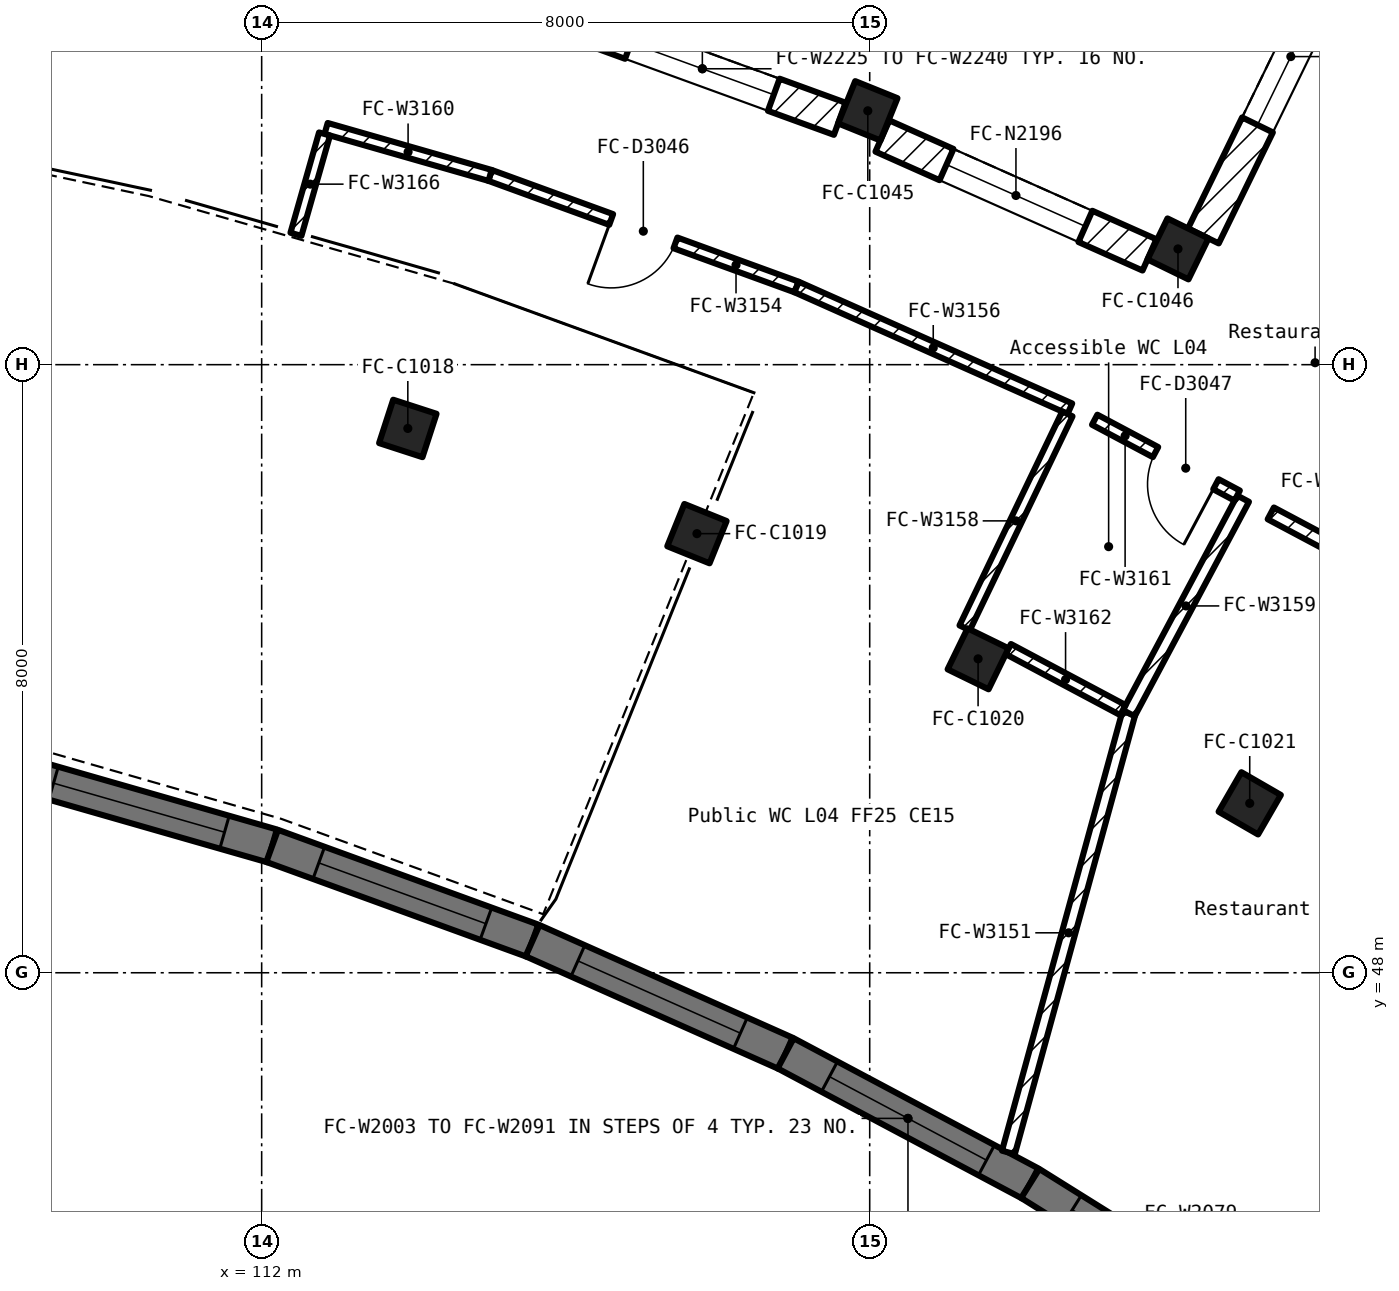
"""IFC4 building model, lengths in metres.
Left out: names, types, materials, properties, quantities, classifications, styles, units other than length and angle.
Written with IfcOpenShell. Run it as: python <this file> out.ifc"""

import sys

from ifc_helpers import new_model, si_unit, direction, frame, frame_2d, origin, origin_2d, place, context, subcontext, project, spatial, rectangle, extrude, element, fill, save


model = new_model("IFC4")
c1 = context("Model", 3, precision=1e-05, world=origin(), true_north=direction((0.0, 1.0)))
c2 = subcontext(c1, "Body", "Model", "MODEL_VIEW")
j1 = project(units=[si_unit("LENGTHUNIT", "METRE"), si_unit("PLANEANGLEUNIT", "RADIAN")], contexts=[c1])
p1 = place(None, origin())
s1 = spatial("IfcSite", under=j1, at=p1, CompositionType="ELEMENT")
p2 = place(p1, origin())
s2 = spatial("IfcBuilding", under=s1, at=p2, CompositionType="ELEMENT")
p3 = place(p2, frame((0.0, 0.0, 22.5)))
s3 = spatial("IfcBuildingStorey", under=s2, at=p3, CompositionType="ELEMENT", Elevation=22.5)
for number, where, z_axis, x_axis in (
    (1, (113.923, 55.161, 0.0), (0.0, 0.0, 1.0), (0.951, -0.309, 0.0)),
    (2, (117.727, 53.777, 0.0), (0.0, 0.0, 1.0), (0.927, -0.375, 0.0)),
    (3, (121.426, 52.13, 0.0), (0.0, 0.0, 1.0), (0.899, -0.438, 0.0)),
    (4, (125.0, 50.229, 0.0), (0.0, 0.0, 1.0), (0.866, -0.5, 0.0)),
    (5, (119.975, 59.34, 0.0), (0.0, 0.0, 1.0), (0.927, -0.375, 0.0)),
    (6, (124.056, 57.523, 0.0), (0.0, 0.0, 1.0), (0.899, -0.438, 0.0)),
):
    element("IfcColumn", number, at=place(p3, frame(where, z_axis=z_axis, x_axis=x_axis)), inside=s3, PredefinedType="COLUMN", context=c2, shape_type="SweptSolid", body=[
        extrude(rectangle(XDim=0.6, YDim=0.6, at=origin_2d()), origin(), (0.0, 0.0, 1.0), 5.5),
    ])
p4 = place(p3, frame((108.634, 50.674, 0.0), z_axis=(0.0, 0.0, 1.0), x_axis=(0.961232761004, -0.275738243942, 0.0)))
e7 = element("IfcWall", 7, at=p4, inside=s3, PredefinedType="SOLIDWALL", context=c2, shape_type="SweptSolid", body=[
    extrude(rectangle(XDim=3.645, YDim=0.45, at=frame_2d((1.823, 0.0))), origin(), (0.0, 0.0, 1.0), 5.5),
])
p5 = place(p4, frame((0.653, 0.0, 1.4)))
e8 = element("IfcOpeningElement", 8, at=p5, cuts=e7, PredefinedType="OPENING", context=c2, shape_type="SweptSolid", body=[
    extrude(rectangle(XDim=2.34, YDim=2.4, at=frame_2d((1.17, 1.2))), frame((0.0, 0.237, 0.0), z_axis=(0.0, -1.0, 0.0), x_axis=(1.0, 0.0, 0.0)), (0.0, 0.0, 1.0), 0.474),
])
p6 = place(p3, frame((112.138, 49.669, 0.0), z_axis=(0.0, 0.0, 1.0), x_axis=(0.939705410483, -0.341985001877, 0.0)))
e9 = element("IfcWall", 9, at=p6, inside=s3, PredefinedType="SOLIDWALL", context=c2, shape_type="SweptSolid", body=[
    extrude(rectangle(XDim=3.646, YDim=0.45, at=frame_2d((1.823, 0.0))), origin(), (0.0, 0.0, 1.0), 5.5),
])
p7 = place(p6, frame((0.653, 0.0, 1.4)))
e10 = element("IfcOpeningElement", 10, at=p7, cuts=e9, PredefinedType="OPENING", context=c2, shape_type="SweptSolid", body=[
    extrude(rectangle(XDim=2.34, YDim=2.4, at=frame_2d((1.17, 1.2))), frame((0.0, 0.237, 0.0), z_axis=(0.0, -1.0, 0.0), x_axis=(1.0, 0.0, 0.0)), (0.0, 0.0, 1.0), 0.474),
])
p8 = place(p3, frame((115.564, 48.422, 0.0), z_axis=(0.0, 0.0, 1.0), x_axis=(0.913593217191, -0.40662935642, 0.0)))
e11 = element("IfcWall", 11, at=p8, inside=s3, PredefinedType="SOLIDWALL", context=c2, shape_type="SweptSolid", body=[
    extrude(rectangle(XDim=3.645, YDim=0.45, at=frame_2d((1.823, 0.0))), origin(), (0.0, 0.0, 1.0), 5.5),
])
p9 = place(p8, frame((0.653, 0.0, 1.4)))
e12 = element("IfcOpeningElement", 12, at=p9, cuts=e11, PredefinedType="OPENING", context=c2, shape_type="SweptSolid", body=[
    extrude(rectangle(XDim=2.34, YDim=2.4, at=frame_2d((1.17, 1.2))), frame((0.0, 0.237, 0.0), z_axis=(0.0, -1.0, 0.0), x_axis=(1.0, 0.0, 0.0)), (0.0, 0.0, 1.0), 0.474),
])
p10 = place(p3, frame((118.894, 46.94, 0.0), z_axis=(0.0, 0.0, 1.0), x_axis=(0.882849344925, -0.469656293651, 0.0)))
e13 = element("IfcWall", 13, at=p10, inside=s3, PredefinedType="SOLIDWALL", context=c2, shape_type="SweptSolid", body=[
    extrude(rectangle(XDim=3.645, YDim=0.45, at=frame_2d((1.823, 0.0))), origin(), (0.0, 0.0, 1.0), 5.5),
])
p11 = place(p10, frame((0.653, 0.0, 1.4)))
e14 = element("IfcOpeningElement", 14, at=p11, cuts=e13, PredefinedType="OPENING", context=c2, shape_type="SweptSolid", body=[
    extrude(rectangle(XDim=2.34, YDim=2.4, at=frame_2d((1.17, 1.2))), frame((0.0, 0.237, 0.0), z_axis=(0.0, -1.0, 0.0), x_axis=(1.0, 0.0, 0.0)), (0.0, 0.0, 1.0), 0.474),
])
p12 = place(p3, frame((122.112, 45.228, 0.0), z_axis=(0.0, 0.0, 1.0), x_axis=(0.848047203697, -0.529920692464, 0.0)))
e15 = element("IfcWall", 15, at=p12, inside=s3, PredefinedType="SOLIDWALL", context=c2, shape_type="SweptSolid", body=[
    extrude(rectangle(XDim=3.646, YDim=0.45, at=frame_2d((1.823, 0.0))), origin(), (0.0, 0.0, 1.0), 5.5),
])
p13 = place(p12, frame((0.653, 0.0, 1.4)))
e16 = element("IfcOpeningElement", 16, at=p13, cuts=e15, PredefinedType="OPENING", context=c2, shape_type="SweptSolid", body=[
    extrude(rectangle(XDim=2.34, YDim=2.4, at=frame_2d((1.17, 1.2))), frame((0.0, 0.237, 0.0), z_axis=(0.0, -1.0, 0.0), x_axis=(1.0, 0.0, 0.0)), (0.0, 0.0, 1.0), 0.474),
])
p14 = place(p3, frame((126.759, 62.551, 0.0), z_axis=(0.0, 0.0, 1.0), x_axis=(-0.4384093903, -0.898775392686, 0.0)))
e17 = element("IfcWall", 17, at=p14, inside=s3, PredefinedType="SOLIDWALL", context=c2, shape_type="SweptSolid", body=[
    extrude(rectangle(XDim=5.404, YDim=0.45, at=frame_2d((2.702, 0.0))), origin(), (0.0, 0.0, 1.0), 4.45),
])
p15 = place(p14, frame((1.779, 0.0, 1.0)))
e18 = element("IfcOpeningElement", 18, at=p15, cuts=e17, PredefinedType="OPENING", context=c2, shape_type="SweptSolid", body=[
    extrude(rectangle(XDim=2.0, YDim=2.8, at=frame_2d((1.0, 1.4))), frame((0.0, 0.237, 0.0), z_axis=(0.0, -1.0, 0.0), x_axis=(1.0, 0.0, 0.0)), (0.0, 0.0, 1.0), 0.474),
])
p16 = place(p3, frame((123.681, 57.444, 0.0), z_axis=(0.0, 0.0, 1.0), x_axis=(-0.913596783635, 0.406621343429, 0.0)))
e19 = element("IfcWall", 19, at=p16, inside=s3, PredefinedType="SOLIDWALL", context=c2, shape_type="SweptSolid", body=[
    extrude(rectangle(XDim=3.846, YDim=0.45, at=frame_2d((1.923, 0.0))), origin(), (0.0, 0.0, 1.0), 4.45),
])
p17 = place(p16, frame((0.923, 0.0, 1.0)))
e20 = element("IfcOpeningElement", 20, at=p17, cuts=e19, PredefinedType="OPENING", context=c2, shape_type="SweptSolid", body=[
    extrude(rectangle(XDim=2.0, YDim=2.8, at=frame_2d((1.0, 1.4))), frame((0.0, 0.237, 0.0), z_axis=(0.0, -1.0, 0.0), x_axis=(1.0, 0.0, 0.0)), (0.0, 0.0, 1.0), 0.474),
])
p18 = place(p3, frame((119.606, 59.235, 0.0), z_axis=(0.0, 0.0, 1.0), x_axis=(-0.939678490681, 0.342058962975, 0.0)))
e21 = element("IfcWall", 21, at=p18, inside=s3, PredefinedType="SOLIDWALL", context=c2, shape_type="SweptSolid", body=[
    extrude(rectangle(XDim=3.847, YDim=0.45, at=frame_2d((1.924, 0.0))), origin(), (0.0, 0.0, 1.0), 4.45),
])
p19 = place(p18, frame((0.924, 0.0, 1.0)))
e22 = element("IfcOpeningElement", 22, at=p19, cuts=e21, PredefinedType="OPENING", context=c2, shape_type="SweptSolid", body=[
    extrude(rectangle(XDim=2.0, YDim=2.8, at=frame_2d((1.0, 1.4))), frame((0.0, 0.237, 0.0), z_axis=(0.0, -1.0, 0.0), x_axis=(1.0, 0.0, 0.0)), (0.0, 0.0, 1.0), 0.474),
])
p20 = place(p3, frame((122.308, 64.712, 0.0), z_axis=(0.0, 0.0, 1.0), x_axis=(-0.374646208341, -0.927167848114, 0.0)))
e23 = element("IfcWall", 23, at=p20, inside=s3, PredefinedType="PARAPET", context=c2, shape_type="SweptSolid", body=[
    extrude(rectangle(XDim=5.84, YDim=0.3, at=frame_2d((2.92, 0.0))), origin(), (0.0, 0.0, 1.0), 1.1),
])
p21 = place(p2, frame((0.0, 0.0, 11.5)))
s4 = spatial("IfcBuildingStorey", under=s2, at=p21, CompositionType="ELEMENT", Elevation=11.5)
p22 = place(p21, frame((109.261, 51.569, 0.0), z_axis=(0.0, 0.0, 1.0), x_axis=(0.207905598736, 0.978148895626, 0.0)))
e24 = element("IfcWall", 24, at=p22, inside=s4, PredefinedType="SOLIDWALL", context=c2, shape_type="SweptSolid", body=[
    extrude(rectangle(XDim=9.101, YDim=0.3, at=frame_2d((4.55, 0.0))), origin(), (0.0, 0.0, 1.0), 16.25),
])
p23 = place(p3, frame((125.697, 43.217, 0.0), z_axis=(0.0, 0.0, 1.0), x_axis=(0.660652130462, 0.750692188927, 0.0)))
e25 = element("IfcWall", 25, at=p23, inside=s3, PredefinedType="PARTITIONING", context=c2, shape_type="SweptSolid", body=[
    extrude(rectangle(XDim=9.083, YDim=0.175, at=frame_2d((4.542, 0.0))), origin(), (0.0, 0.0, 1.0), 4.35),
])
p24 = place(p3, frame((123.409, 51.415, 0.0), z_axis=(0.0, 0.0, 1.0), x_axis=(-0.264341053294, -0.964429265184, 0.0)))
e26 = element("IfcWall", 26, at=p24, inside=s3, PredefinedType="PARTITIONING", context=c2, shape_type="SweptSolid", body=[
    extrude(rectangle(XDim=5.992, YDim=0.175, at=frame_2d((2.996, 0.0))), origin(), (0.0, 0.0, 1.0), 4.35),
])
p25 = place(p3, frame((119.038, 57.022, 0.0), z_axis=(0.0, 0.0, 1.0), x_axis=(-0.939688749988, 0.342030778068, 0.0)))
e27 = element("IfcWall", 27, at=p25, inside=s3, PredefinedType="PARTITIONING", context=c2, shape_type="SweptSolid", body=[
    extrude(rectangle(XDim=4.292, YDim=0.15, at=frame_2d((2.146, 0.0))), origin(), (0.0, 0.0, 1.0), 4.35),
])
p26 = place(p25, frame((1.696, 0.0, 0.0)))
e28 = element("IfcOpeningElement", 28, at=p26, cuts=e27, PredefinedType="OPENING", context=c2, shape_type="SweptSolid", body=[
    extrude(rectangle(XDim=0.9, YDim=2.1, at=frame_2d((0.45, 1.05))), frame((0.0, 0.087, 0.0), z_axis=(0.0, -1.0, 0.0), x_axis=(1.0, 0.0, 0.0)), (0.0, 0.0, 1.0), 0.174),
])
p27 = place(p3, frame((122.634, 55.421, 0.0), z_axis=(0.0, 0.0, 1.0), x_axis=(-0.913540233147, 0.406748377282, 0.0)))
e29 = element("IfcWall", 29, at=p27, inside=s3, PredefinedType="PARTITIONING", context=c2, shape_type="SweptSolid", body=[
    extrude(rectangle(XDim=3.936, YDim=0.15, at=frame_2d((1.968, 0.0))), origin(), (0.0, 0.0, 1.0), 4.35),
])
p28 = place(p3, frame((122.601, 55.353, 0.0), z_axis=(0.0, 0.0, 1.0), x_axis=(-0.432837781937, -0.901471826808, 0.0)))
e30 = element("IfcWall", 30, at=p28, inside=s3, PredefinedType="PARTITIONING", context=c2, shape_type="SweptSolid", body=[
    extrude(rectangle(XDim=3.124, YDim=0.15, at=frame_2d((1.562, 0.0))), origin(), (0.0, 0.0, 1.0), 4.35),
])
p29 = place(p3, frame((124.913, 54.237, 0.0), z_axis=(0.0, 0.0, 1.0), x_axis=(-0.470362354522, -0.88247337379, 0.0)))
e31 = element("IfcWall", 31, at=p29, inside=s3, PredefinedType="PARTITIONING", context=c2, shape_type="SweptSolid", body=[
    extrude(rectangle(XDim=3.198, YDim=0.175, at=frame_2d((1.599, 0.0))), origin(), (0.0, 0.0, 1.0), 4.35),
])
p30 = place(p3, frame((115.005, 58.49, 0.0), z_axis=(0.0, 0.0, 1.0), x_axis=(-0.961330727759, 0.275396499373, 0.0)))
e32 = element("IfcWall", 32, at=p30, inside=s3, PredefinedType="PARTITIONING", context=c2, shape_type="SweptSolid", body=[
    extrude(rectangle(XDim=2.244, YDim=0.15, at=frame_2d((1.122, 0.0))), origin(), (0.0, 0.0, 1.0), 4.35),
])
p31 = place(p3, frame((124.835, 54.278, 0.0), z_axis=(0.0, 0.0, 1.0), x_axis=(-0.882782128036, 0.469782624646, 0.0)))
e33 = element("IfcWall", 33, at=p31, inside=s3, PredefinedType="PARTITIONING", context=c2, shape_type="SweptSolid", body=[
    extrude(rectangle(XDim=2.124, YDim=0.15, at=frame_2d((1.062, 0.0))), origin(), (0.0, 0.0, 1.0), 4.35),
])
p32 = place(p31, frame((0.317, 0.0, 0.0)))
e34 = element("IfcOpeningElement", 34, at=p32, cuts=e33, PredefinedType="OPENING", context=c2, shape_type="SweptSolid", body=[
    extrude(rectangle(XDim=0.9, YDim=2.1, at=frame_2d((0.45, 1.05))), frame((0.0, 0.087, 0.0), z_axis=(0.0, -1.0, 0.0), x_axis=(1.0, 0.0, 0.0)), (0.0, 0.0, 1.0), 0.174),
])
p33 = place(p3, frame((121.823, 52.259, 0.0), z_axis=(0.0, 0.0, 1.0), x_axis=(0.882673141799, -0.469987366582, 0.0)))
e35 = element("IfcWall", 35, at=p33, inside=s3, PredefinedType="PARTITIONING", context=c2, shape_type="SweptSolid", body=[
    extrude(rectangle(XDim=1.708, YDim=0.15, at=frame_2d((0.854, 0.0))), origin(), (0.0, 0.0, 1.0), 4.35),
])
p34 = place(p3, frame((126.75, 53.261, 0.0), z_axis=(0.0, 0.0, 1.0), x_axis=(-0.882996305716, 0.469379935758, 0.0)))
e36 = element("IfcWall", 36, at=p34, inside=s3, PredefinedType="PARTITIONING", context=c2, shape_type="SweptSolid", body=[
    extrude(rectangle(XDim=1.668, YDim=0.175, at=frame_2d((0.834, 0.0))), origin(), (0.0, 0.0, 1.0), 4.35),
])
p35 = place(p3, frame((112.827, 59.035, 0.0), z_axis=(0.0, 0.0, 1.0), x_axis=(-0.273969155997, -0.961738478778, 0.0)))
e37 = element("IfcWall", 37, at=p35, inside=s3, PredefinedType="PARTITIONING", context=c2, shape_type="SweptSolid", body=[
    extrude(rectangle(XDim=1.372, YDim=0.15, at=frame_2d((0.686, 0.0))), origin(), (0.0, 0.0, 1.0), 4.35),
])
p36 = place(p5, origin())
e38 = element("IfcWindow", 38, at=p36, inside=s3, PartitioningType="TRIPLE_PANEL_VERTICAL", PredefinedType="WINDOW", context=c2, shape_type="SweptSolid", body=[
    extrude(rectangle(XDim=2.34, YDim=2.4, at=frame_2d((1.17, 1.2))), frame((0.0, 0.03, 0.0), z_axis=(0.0, -1.0, 0.0), x_axis=(1.0, 0.0, 0.0)), (0.0, 0.0, 1.0), 0.06),
])
fill(e8, e38)
p37 = place(p7, origin())
e39 = element("IfcWindow", 39, at=p37, inside=s3, PartitioningType="TRIPLE_PANEL_VERTICAL", PredefinedType="WINDOW", context=c2, shape_type="SweptSolid", body=[
    extrude(rectangle(XDim=2.34, YDim=2.4, at=frame_2d((1.17, 1.2))), frame((0.0, 0.03, 0.0), z_axis=(0.0, -1.0, 0.0), x_axis=(1.0, 0.0, 0.0)), (0.0, 0.0, 1.0), 0.06),
])
fill(e10, e39)
p38 = place(p9, origin())
e40 = element("IfcWindow", 40, at=p38, inside=s3, PartitioningType="TRIPLE_PANEL_VERTICAL", PredefinedType="WINDOW", context=c2, shape_type="SweptSolid", body=[
    extrude(rectangle(XDim=2.34, YDim=2.4, at=frame_2d((1.17, 1.2))), frame((0.0, 0.03, 0.0), z_axis=(0.0, -1.0, 0.0), x_axis=(1.0, 0.0, 0.0)), (0.0, 0.0, 1.0), 0.06),
])
fill(e12, e40)
p39 = place(p11, origin())
e41 = element("IfcWindow", 41, at=p39, inside=s3, PartitioningType="TRIPLE_PANEL_VERTICAL", PredefinedType="WINDOW", context=c2, shape_type="SweptSolid", body=[
    extrude(rectangle(XDim=2.34, YDim=2.4, at=frame_2d((1.17, 1.2))), frame((0.0, 0.03, 0.0), z_axis=(0.0, -1.0, 0.0), x_axis=(1.0, 0.0, 0.0)), (0.0, 0.0, 1.0), 0.06),
])
fill(e14, e41)
p40 = place(p13, origin())
e42 = element("IfcWindow", 42, at=p40, inside=s3, PartitioningType="TRIPLE_PANEL_VERTICAL", PredefinedType="WINDOW", context=c2, shape_type="SweptSolid", body=[
    extrude(rectangle(XDim=2.34, YDim=2.4, at=frame_2d((1.17, 1.2))), frame((0.0, 0.03, 0.0), z_axis=(0.0, -1.0, 0.0), x_axis=(1.0, 0.0, 0.0)), (0.0, 0.0, 1.0), 0.06),
])
fill(e16, e42)
p41 = place(p15, origin())
e43 = element("IfcWindow", 43, at=p41, inside=s3, PartitioningType="DOUBLE_PANEL_VERTICAL", PredefinedType="WINDOW", context=c2, shape_type="SweptSolid", body=[
    extrude(rectangle(XDim=2.0, YDim=2.8, at=frame_2d((1.0, 1.4))), frame((0.0, 0.03, 0.0), z_axis=(0.0, -1.0, 0.0), x_axis=(1.0, 0.0, 0.0)), (0.0, 0.0, 1.0), 0.06),
])
fill(e18, e43)
p42 = place(p17, origin())
e44 = element("IfcWindow", 44, at=p42, inside=s3, PartitioningType="DOUBLE_PANEL_VERTICAL", PredefinedType="WINDOW", context=c2, shape_type="SweptSolid", body=[
    extrude(rectangle(XDim=2.0, YDim=2.8, at=frame_2d((1.0, 1.4))), frame((0.0, 0.03, 0.0), z_axis=(0.0, -1.0, 0.0), x_axis=(1.0, 0.0, 0.0)), (0.0, 0.0, 1.0), 0.06),
])
fill(e20, e44)
p43 = place(p19, origin())
e45 = element("IfcWindow", 45, at=p43, inside=s3, PartitioningType="DOUBLE_PANEL_VERTICAL", PredefinedType="WINDOW", context=c2, shape_type="SweptSolid", body=[
    extrude(rectangle(XDim=2.0, YDim=2.8, at=frame_2d((1.0, 1.4))), frame((0.0, 0.03, 0.0), z_axis=(0.0, -1.0, 0.0), x_axis=(1.0, 0.0, 0.0)), (0.0, 0.0, 1.0), 0.06),
])
fill(e22, e45)
p44 = place(p26, origin())
e46 = element("IfcDoor", 46, at=p44, inside=s3, OperationType="SINGLE_SWING_RIGHT", PredefinedType="DOOR", context=c2, shape_type="SweptSolid", body=[
    extrude(rectangle(XDim=0.9, YDim=2.1, at=frame_2d((0.45, 1.05))), frame((0.0, 0.025, 0.0), z_axis=(0.0, -1.0, 0.0), x_axis=(1.0, 0.0, 0.0)), (0.0, 0.0, 1.0), 0.05),
])
fill(e28, e46)
p45 = place(p32, origin())
e47 = element("IfcDoor", 47, at=p45, inside=s3, OperationType="SINGLE_SWING_LEFT", PredefinedType="DOOR", context=c2, shape_type="SweptSolid", body=[
    extrude(rectangle(XDim=0.9, YDim=2.1, at=frame_2d((0.45, 1.05))), frame((0.0, 0.025, 0.0), z_axis=(0.0, -1.0, 0.0), x_axis=(1.0, 0.0, 0.0)), (0.0, 0.0, 1.0), 0.05),
])
fill(e34, e47)
save(model, sys.argv[1])
